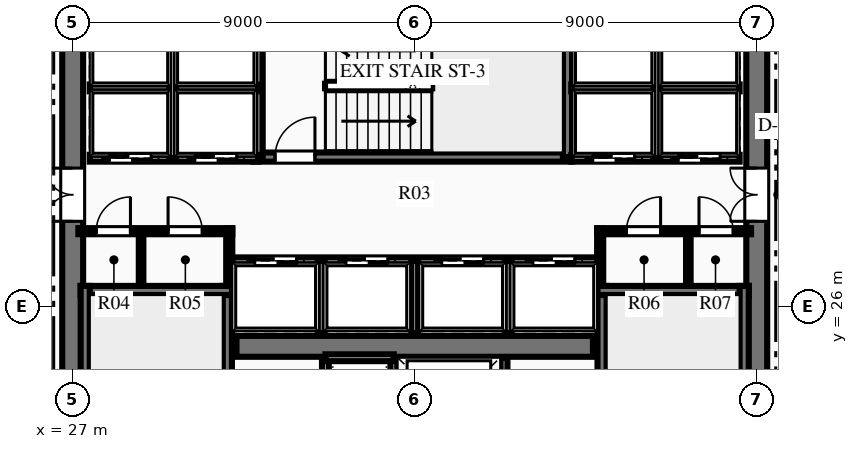
"""IFC4 building model, lengths in metres.
Left out: names, types, materials, properties, quantities, classifications, styles, units other than length and angle.
Written with IfcOpenShell. Run it as: python <this file> out.ifc"""

import sys

from ifc_helpers import new_model, si_unit, direction, frame, frame_2d, origin, place, context, subcontext, project, spatial, rectangle, extrude, element, fill, save


model = new_model("IFC4")
c1 = context("Model", 3, precision=1e-05, world=origin(), true_north=direction((0.0, 1.0)))
c2 = subcontext(c1, "Body", "Model", "MODEL_VIEW")
j1 = project(units=[si_unit("LENGTHUNIT", "METRE"), si_unit("PLANEANGLEUNIT", "RADIAN")], contexts=[c1])
p1 = place(None, origin())
s1 = spatial("IfcSite", under=j1, at=p1, CompositionType="ELEMENT")
p2 = place(p1, origin())
s2 = spatial("IfcBuilding", under=s1, at=p2, CompositionType="ELEMENT")
p3 = place(p2, frame((0.0, 0.0, 109.2)))
s3 = spatial("IfcBuildingStorey", under=s2, at=p3, CompositionType="ELEMENT", Elevation=109.2)
p4 = place(p3, frame((27.0, 18.275, 0.0), z_axis=(0.0, 0.0, 1.0), x_axis=(0.0, 1.0, 0.0)))
e1 = element("IfcWall", 1, at=p4, inside=s3, PredefinedType="SHEAR", context=c2, shape_type="SweptSolid", body=[
    extrude(rectangle(XDim=15.45, YDim=0.55, at=frame_2d((7.725, 0.0))), origin(), (0.0, 0.0, 1.0), 3.75),
])
p5 = place(p4, frame((9.965, 0.0, 0.0)))
e2 = element("IfcOpeningElement", 2, at=p5, cuts=e1, PredefinedType="OPENING", context=c2, shape_type="SweptSolid", body=[
    extrude(rectangle(XDim=1.4, YDim=2.2, at=frame_2d((0.7, 1.1))), frame((0.0, 0.285, 0.0), z_axis=(0.0, -1.0, 0.0), x_axis=(1.0, 0.0, 0.0)), (0.0, 0.0, 1.0), 0.57),
])
p6 = place(p3, frame((45.0, 18.275, 0.0), z_axis=(0.0, 0.0, 1.0), x_axis=(0.0, 1.0, 0.0)))
e3 = element("IfcWall", 3, at=p6, inside=s3, PredefinedType="SHEAR", context=c2, shape_type="SweptSolid", body=[
    extrude(rectangle(XDim=15.45, YDim=0.55, at=frame_2d((7.725, 0.0))), origin(), (0.0, 0.0, 1.0), 3.75),
])
p7 = place(p6, frame((9.965, 0.0, 0.0)))
e4 = element("IfcOpeningElement", 4, at=p7, cuts=e3, PredefinedType="OPENING", context=c2, shape_type="SweptSolid", body=[
    extrude(rectangle(XDim=1.4, YDim=2.2, at=frame_2d((0.7, 1.1))), frame((0.0, 0.285, 0.0), z_axis=(0.0, -1.0, 0.0), x_axis=(1.0, 0.0, 0.0)), (0.0, 0.0, 1.0), 0.57),
])
p8 = place(p3, frame((31.31, 24.95, 0.0), z_axis=(0.0, 0.0, 1.0), x_axis=(1.0, 0.0, 0.0)))
e5 = element("IfcWall", 5, at=p8, inside=s3, PredefinedType="SHEAR", context=c2, shape_type="SweptSolid", body=[
    extrude(rectangle(XDim=9.38, YDim=0.55, at=frame_2d((4.69, 0.0))), origin(), (0.0, 0.0, 1.0), 3.75),
])
p9 = place(p3, frame((31.07, 18.28, 0.0), z_axis=(0.0, 0.0, 1.0), x_axis=(0.0, 1.0, 0.0)))
e6 = element("IfcWall", 6, at=p9, inside=s3, PredefinedType="SHEAR", context=c2, shape_type="SweptSolid", body=[
    extrude(rectangle(XDim=8.26, YDim=0.24, at=frame_2d((4.13, 0.0))), origin(), (0.0, 0.0, 1.0), 3.75),
])
p10 = place(p9, frame((0.365, 0.0, 0.0)))
e7 = element("IfcOpeningElement", 7, at=p10, cuts=e6, PredefinedType="OPENING", context=c2, shape_type="SweptSolid", body=[
    extrude(rectangle(XDim=1.05, YDim=2.15, at=frame_2d((0.525, 1.075))), frame((0.0, 0.13, 0.0), z_axis=(0.0, -1.0, 0.0), x_axis=(1.0, 0.0, 0.0)), (0.0, 0.0, 1.0), 0.26),
])
p11 = place(p3, frame((27.21, 26.42, 0.0), z_axis=(0.0, 0.0, 1.0), x_axis=(1.0, 0.0, 0.0)))
e8 = element("IfcWall", 8, at=p11, inside=s3, PredefinedType="SHEAR", context=c2, shape_type="SweptSolid", body=[
    extrude(rectangle(XDim=3.98, YDim=0.24, at=frame_2d((1.99, 0.0))), origin(), (0.0, 0.0, 1.0), 3.75),
])
p12 = place(p3, frame((27.33, 18.28, 0.0), z_axis=(0.0, 0.0, 1.0), x_axis=(0.0, 1.0, 0.0)))
e9 = element("IfcWall", 9, at=p12, inside=s3, PredefinedType="SHEAR", context=c2, shape_type="SweptSolid", body=[
    extrude(rectangle(XDim=8.26, YDim=0.24, at=frame_2d((4.13, 0.0))), origin(), (0.0, 0.0, 1.0), 3.75),
])
p13 = place(p3, frame((40.93, 18.28, 0.0), z_axis=(0.0, 0.0, 1.0), x_axis=(0.0, 1.0, 0.0)))
e10 = element("IfcWall", 10, at=p13, inside=s3, PredefinedType="SHEAR", context=c2, shape_type="SweptSolid", body=[
    extrude(rectangle(XDim=8.26, YDim=0.24, at=frame_2d((4.13, 0.0))), origin(), (0.0, 0.0, 1.0), 3.75),
])
p14 = place(p13, frame((0.365, 0.0, 0.0)))
e11 = element("IfcOpeningElement", 11, at=p14, cuts=e10, PredefinedType="OPENING", context=c2, shape_type="SweptSolid", body=[
    extrude(rectangle(XDim=1.05, YDim=2.15, at=frame_2d((0.525, 1.075))), frame((0.0, 0.13, 0.0), z_axis=(0.0, -1.0, 0.0), x_axis=(1.0, 0.0, 0.0)), (0.0, 0.0, 1.0), 0.26),
])
p15 = place(p3, frame((40.81, 26.42, 0.0), z_axis=(0.0, 0.0, 1.0), x_axis=(1.0, 0.0, 0.0)))
e12 = element("IfcWall", 12, at=p15, inside=s3, PredefinedType="SHEAR", context=c2, shape_type="SweptSolid", body=[
    extrude(rectangle(XDim=3.98, YDim=0.24, at=frame_2d((1.99, 0.0))), origin(), (0.0, 0.0, 1.0), 3.75),
])
p16 = place(p3, frame((44.67, 18.28, 0.0), z_axis=(0.0, 0.0, 1.0), x_axis=(0.0, 1.0, 0.0)))
e13 = element("IfcWall", 13, at=p16, inside=s3, PredefinedType="SHEAR", context=c2, shape_type="SweptSolid", body=[
    extrude(rectangle(XDim=8.26, YDim=0.24, at=frame_2d((4.13, 0.0))), origin(), (0.0, 0.0, 1.0), 3.75),
])
p17 = place(p3, frame((31.76, 29.93, 0.0), z_axis=(0.0, 0.0, 1.0), x_axis=(1.0, 0.0, 0.0)))
e14 = element("IfcWall", 14, at=p17, inside=s3, PredefinedType="SHEAR", context=c2, shape_type="SweptSolid", body=[
    extrude(rectangle(XDim=8.38, YDim=0.24, at=frame_2d((4.19, 0.0))), origin(), (0.0, 0.0, 1.0), 3.75),
])
p18 = place(p17, frame((0.565, 0.0, 0.0)))
e15 = element("IfcOpeningElement", 15, at=p18, cuts=e14, PredefinedType="OPENING", context=c2, shape_type="SweptSolid", body=[
    extrude(rectangle(XDim=1.05, YDim=2.15, at=frame_2d((0.525, 1.075))), frame((0.0, 0.13, 0.0), z_axis=(0.0, -1.0, 0.0), x_axis=(1.0, 0.0, 0.0)), (0.0, 0.0, 1.0), 0.26),
])
p19 = place(p3, frame((31.88, 29.93, 0.0), z_axis=(0.0, 0.0, 1.0), x_axis=(0.0, 1.0, 0.0)))
e16 = element("IfcWall", 16, at=p19, inside=s3, PredefinedType="SHEAR", context=c2, shape_type="SweptSolid", body=[
    extrude(rectangle(XDim=3.79, YDim=0.24, at=frame_2d((1.895, 0.0))), origin(), (0.0, 0.0, 1.0), 3.75),
])
p20 = place(p3, frame((40.02, 29.93, 0.0), z_axis=(0.0, 0.0, 1.0), x_axis=(0.0, 1.0, 0.0)))
e17 = element("IfcWall", 17, at=p20, inside=s3, PredefinedType="SHEAR", context=c2, shape_type="SweptSolid", body=[
    extrude(rectangle(XDim=3.85, YDim=0.24, at=frame_2d((1.925, 0.0))), origin(), (0.0, 0.0, 1.0), 3.75),
])
for number, where, z_axis, x_axis in (
    (18, (33.65, 22.05, 0.0), (0.0, 0.0, 1.0), (0.0, 1.0, 0.0)),
    (19, (35.45, 22.05, 0.0), (0.0, 0.0, 1.0), (0.0, 1.0, 0.0)),
):
    element("IfcWall", number, at=place(p3, frame(where, z_axis=z_axis, x_axis=x_axis)), inside=s3, PredefinedType="PARTITIONING", context=c2, shape_type="SweptSolid", body=[
        extrude(rectangle(XDim=2.6, YDim=0.18, at=frame_2d((1.3, 0.0))), origin(), (0.0, 0.0, 1.0), 3.45),
    ])
p21 = place(p3, frame((33.65, 24.65, 0.0), z_axis=(0.0, 0.0, 1.0), x_axis=(1.0, 0.0, 0.0)))
e20 = element("IfcWall", 20, at=p21, inside=s3, PredefinedType="PARTITIONING", context=c2, shape_type="SweptSolid", body=[
    extrude(rectangle(XDim=1.8, YDim=0.18, at=frame_2d((0.9, 0.0))), origin(), (0.0, 0.0, 1.0), 3.45),
])
p22 = place(p3, frame((38.35, 22.05, 0.0), z_axis=(0.0, 0.0, 1.0), x_axis=(0.0, 1.0, 0.0)))
e21 = element("IfcWall", 21, at=p22, inside=s3, PredefinedType="PARTITIONING", context=c2, shape_type="SweptSolid", body=[
    extrude(rectangle(XDim=2.6, YDim=0.18, at=frame_2d((1.3, 0.0))), origin(), (0.0, 0.0, 1.0), 3.45),
])
p23 = place(p3, frame((27.15, 27.98, 0.0), z_axis=(0.0, 0.0, 1.0), x_axis=(1.0, 0.0, 0.0)))
e22 = element("IfcWall", 22, at=p23, inside=s3, PredefinedType="PARTITIONING", context=c2, shape_type="SweptSolid", body=[
    extrude(rectangle(XDim=4.05, YDim=0.16, at=frame_2d((2.025, 0.0))), origin(), (0.0, 0.0, 1.0), 3.45),
])
p24 = place(p23, frame((0.47, 0.0, 0.0)))
e23 = element("IfcOpeningElement", 23, at=p24, cuts=e22, PredefinedType="OPENING", context=c2, shape_type="SweptSolid", body=[
    extrude(rectangle(XDim=0.9, YDim=2.15, at=frame_2d((0.45, 1.075))), frame((0.0, 0.09, 0.0), z_axis=(0.0, -1.0, 0.0), x_axis=(1.0, 0.0, 0.0)), (0.0, 0.0, 1.0), 0.18),
])
p25 = place(p23, frame((2.36, 0.0, 0.0)))
e24 = element("IfcOpeningElement", 24, at=p25, cuts=e22, PredefinedType="OPENING", context=c2, shape_type="SweptSolid", body=[
    extrude(rectangle(XDim=0.9, YDim=2.15, at=frame_2d((0.45, 1.075))), frame((0.0, 0.09, 0.0), z_axis=(0.0, -1.0, 0.0), x_axis=(1.0, 0.0, 0.0)), (0.0, 0.0, 1.0), 0.18),
])
p26 = place(p3, frame((31.12, 26.54, 0.0), z_axis=(0.0, 0.0, 1.0), x_axis=(0.0, 1.0, 0.0)))
e25 = element("IfcWall", 25, at=p26, inside=s3, PredefinedType="PARTITIONING", context=c2, shape_type="SweptSolid", body=[
    extrude(rectangle(XDim=1.51, YDim=0.16, at=frame_2d((0.755, 0.0))), origin(), (0.0, 0.0, 1.0), 3.45),
])
p27 = place(p3, frame((40.8, 27.98, 0.0), z_axis=(0.0, 0.0, 1.0), x_axis=(1.0, 0.0, 0.0)))
e26 = element("IfcWall", 26, at=p27, inside=s3, PredefinedType="PARTITIONING", context=c2, shape_type="SweptSolid", body=[
    extrude(rectangle(XDim=4.05, YDim=0.16, at=frame_2d((2.025, 0.0))), origin(), (0.0, 0.0, 1.0), 3.45),
])
p28 = place(p27, frame((0.77, 0.0, 0.0)))
e27 = element("IfcOpeningElement", 27, at=p28, cuts=e26, PredefinedType="OPENING", context=c2, shape_type="SweptSolid", body=[
    extrude(rectangle(XDim=0.9, YDim=2.15, at=frame_2d((0.45, 1.075))), frame((0.0, 0.09, 0.0), z_axis=(0.0, -1.0, 0.0), x_axis=(1.0, 0.0, 0.0)), (0.0, 0.0, 1.0), 0.18),
])
p29 = place(p27, frame((2.68, 0.0, 0.0)))
e28 = element("IfcOpeningElement", 28, at=p29, cuts=e26, PredefinedType="OPENING", context=c2, shape_type="SweptSolid", body=[
    extrude(rectangle(XDim=0.9, YDim=2.15, at=frame_2d((0.45, 1.075))), frame((0.0, 0.09, 0.0), z_axis=(0.0, -1.0, 0.0), x_axis=(1.0, 0.0, 0.0)), (0.0, 0.0, 1.0), 0.18),
])
p30 = place(p3, frame((40.88, 26.54, 0.0), z_axis=(0.0, 0.0, 1.0), x_axis=(0.0, 1.0, 0.0)))
e29 = element("IfcWall", 29, at=p30, inside=s3, PredefinedType="PARTITIONING", context=c2, shape_type="SweptSolid", body=[
    extrude(rectangle(XDim=1.51, YDim=0.16, at=frame_2d((0.755, 0.0))), origin(), (0.0, 0.0, 1.0), 3.45),
])
for number, where, z_axis, x_axis in (
    (30, (28.8, 26.54, 0.0), (0.0, 0.0, 1.0), (0.0, 1.0, 0.0)),
    (31, (43.2, 26.54, 0.0), (0.0, 0.0, 1.0), (0.0, 1.0, 0.0)),
):
    element("IfcWall", number, at=place(p3, frame(where, z_axis=z_axis, x_axis=x_axis)), inside=s3, PredefinedType="PARTITIONING", context=c2, shape_type="SweptSolid", body=[
        extrude(rectangle(XDim=1.44, YDim=0.12, at=frame_2d((0.72, 0.0))), origin(), (0.0, 0.0, 1.0), 3.45),
    ])
p31 = place(p3, frame((27.45, 29.9, 0.0), z_axis=(0.0, 0.0, 1.0), x_axis=(1.0, 0.0, 0.0)))
e32 = element("IfcWall", 32, at=p31, inside=s3, PredefinedType="PARTITIONING", context=c2, shape_type="SweptSolid", body=[
    extrude(rectangle(XDim=4.43, YDim=0.18, at=frame_2d((2.215, 0.0))), origin(), (0.0, 0.0, 1.0), 3.45),
])
p32 = place(p31, frame((0.515, 0.0, 0.0)))
e33 = element("IfcOpeningElement", 33, at=p32, cuts=e32, PredefinedType="OPENING", context=c2, shape_type="SweptSolid", body=[
    extrude(rectangle(XDim=1.1, YDim=2.15, at=frame_2d((0.55, 1.075))), frame((0.0, 0.1, 0.0), z_axis=(0.0, -1.0, 0.0), x_axis=(1.0, 0.0, 0.0)), (0.0, 0.0, 1.0), 0.2),
])
p33 = place(p31, frame((2.765, 0.0, 0.0)))
e34 = element("IfcOpeningElement", 34, at=p33, cuts=e32, PredefinedType="OPENING", context=c2, shape_type="SweptSolid", body=[
    extrude(rectangle(XDim=1.1, YDim=2.15, at=frame_2d((0.55, 1.075))), frame((0.0, 0.1, 0.0), z_axis=(0.0, -1.0, 0.0), x_axis=(1.0, 0.0, 0.0)), (0.0, 0.0, 1.0), 0.2),
])
p34 = place(p3, frame((27.45, 31.75, 0.0), z_axis=(0.0, 0.0, 1.0), x_axis=(1.0, 0.0, 0.0)))
e35 = element("IfcWall", 35, at=p34, inside=s3, PredefinedType="PARTITIONING", context=c2, shape_type="SweptSolid", body=[
    extrude(rectangle(XDim=4.43, YDim=0.18, at=frame_2d((2.215, 0.0))), origin(), (0.0, 0.0, 1.0), 3.45),
])
p35 = place(p3, frame((29.63, 29.9, 0.0), z_axis=(0.0, 0.0, 1.0), x_axis=(0.0, 1.0, 0.0)))
e36 = element("IfcWall", 36, at=p35, inside=s3, PredefinedType="PARTITIONING", context=c2, shape_type="SweptSolid", body=[
    extrude(rectangle(XDim=3.75, YDim=0.18, at=frame_2d((1.875, 0.0))), origin(), (0.0, 0.0, 1.0), 3.45),
])
p36 = place(p3, frame((40.12, 29.9, 0.0), z_axis=(0.0, 0.0, 1.0), x_axis=(1.0, 0.0, 0.0)))
e37 = element("IfcWall", 37, at=p36, inside=s3, PredefinedType="PARTITIONING", context=c2, shape_type="SweptSolid", body=[
    extrude(rectangle(XDim=4.43, YDim=0.18, at=frame_2d((2.215, 0.0))), origin(), (0.0, 0.0, 1.0), 3.45),
])
p37 = place(p36, frame((0.565, 0.0, 0.0)))
e38 = element("IfcOpeningElement", 38, at=p37, cuts=e37, PredefinedType="OPENING", context=c2, shape_type="SweptSolid", body=[
    extrude(rectangle(XDim=1.1, YDim=2.15, at=frame_2d((0.55, 1.075))), frame((0.0, 0.1, 0.0), z_axis=(0.0, -1.0, 0.0), x_axis=(1.0, 0.0, 0.0)), (0.0, 0.0, 1.0), 0.2),
])
p38 = place(p36, frame((2.815, 0.0, 0.0)))
e39 = element("IfcOpeningElement", 39, at=p38, cuts=e37, PredefinedType="OPENING", context=c2, shape_type="SweptSolid", body=[
    extrude(rectangle(XDim=1.1, YDim=2.15, at=frame_2d((0.55, 1.075))), frame((0.0, 0.1, 0.0), z_axis=(0.0, -1.0, 0.0), x_axis=(1.0, 0.0, 0.0)), (0.0, 0.0, 1.0), 0.2),
])
p39 = place(p3, frame((40.12, 31.75, 0.0), z_axis=(0.0, 0.0, 1.0), x_axis=(1.0, 0.0, 0.0)))
e40 = element("IfcWall", 40, at=p39, inside=s3, PredefinedType="PARTITIONING", context=c2, shape_type="SweptSolid", body=[
    extrude(rectangle(XDim=4.43, YDim=0.18, at=frame_2d((2.215, 0.0))), origin(), (0.0, 0.0, 1.0), 3.45),
])
p40 = place(p3, frame((42.37, 29.9, 0.0), z_axis=(0.0, 0.0, 1.0), x_axis=(0.0, 1.0, 0.0)))
e41 = element("IfcWall", 41, at=p40, inside=s3, PredefinedType="PARTITIONING", context=c2, shape_type="SweptSolid", body=[
    extrude(rectangle(XDim=3.75, YDim=0.18, at=frame_2d((1.875, 0.0))), origin(), (0.0, 0.0, 1.0), 3.45),
])
p41 = place(p3, frame((31.2, 27.2, 0.0), z_axis=(0.0, 0.0, 1.0), x_axis=(1.0, 0.0, 0.0)))
e42 = element("IfcWall", 42, at=p41, inside=s3, PredefinedType="PARTITIONING", context=c2, shape_type="SweptSolid", body=[
    extrude(rectangle(XDim=9.6, YDim=0.18, at=frame_2d((4.8, 0.0))), origin(), (0.0, 0.0, 1.0), 3.45),
])
p42 = place(p41, frame((0.59, 0.0, 0.0)))
e43 = element("IfcOpeningElement", 43, at=p42, cuts=e42, PredefinedType="OPENING", context=c2, shape_type="SweptSolid", body=[
    extrude(rectangle(XDim=1.1, YDim=2.15, at=frame_2d((0.55, 1.075))), frame((0.0, 0.1, 0.0), z_axis=(0.0, -1.0, 0.0), x_axis=(1.0, 0.0, 0.0)), (0.0, 0.0, 1.0), 0.2),
])
p43 = place(p41, frame((2.99, 0.0, 0.0)))
e44 = element("IfcOpeningElement", 44, at=p43, cuts=e42, PredefinedType="OPENING", context=c2, shape_type="SweptSolid", body=[
    extrude(rectangle(XDim=1.1, YDim=2.15, at=frame_2d((0.55, 1.075))), frame((0.0, 0.1, 0.0), z_axis=(0.0, -1.0, 0.0), x_axis=(1.0, 0.0, 0.0)), (0.0, 0.0, 1.0), 0.2),
])
p44 = place(p41, frame((5.51, 0.0, 0.0)))
e45 = element("IfcOpeningElement", 45, at=p44, cuts=e42, PredefinedType="OPENING", context=c2, shape_type="SweptSolid", body=[
    extrude(rectangle(XDim=1.1, YDim=2.15, at=frame_2d((0.55, 1.075))), frame((0.0, 0.1, 0.0), z_axis=(0.0, -1.0, 0.0), x_axis=(1.0, 0.0, 0.0)), (0.0, 0.0, 1.0), 0.2),
])
p45 = place(p41, frame((7.91, 0.0, 0.0)))
e46 = element("IfcOpeningElement", 46, at=p45, cuts=e42, PredefinedType="OPENING", context=c2, shape_type="SweptSolid", body=[
    extrude(rectangle(XDim=1.1, YDim=2.15, at=frame_2d((0.55, 1.075))), frame((0.0, 0.1, 0.0), z_axis=(0.0, -1.0, 0.0), x_axis=(1.0, 0.0, 0.0)), (0.0, 0.0, 1.0), 0.2),
])
for number, where, z_axis, x_axis in (
    (47, (33.54, 25.3, 0.0), (0.0, 0.0, 1.0), (0.0, 1.0, 0.0)),
    (48, (36.0, 25.3, 0.0), (0.0, 0.0, 1.0), (0.0, 1.0, 0.0)),
    (49, (38.46, 25.3, 0.0), (0.0, 0.0, 1.0), (0.0, 1.0, 0.0)),
):
    element("IfcWall", number, at=place(p3, frame(where, z_axis=z_axis, x_axis=x_axis)), inside=s3, PredefinedType="PARTITIONING", context=c2, shape_type="SweptSolid", body=[
        extrude(rectangle(XDim=1.9, YDim=0.18, at=frame_2d((0.95, 0.0))), origin(), (0.0, 0.0, 1.0), 3.45),
    ])
p46 = place(p24, origin())
e50 = element("IfcDoor", 50, at=p46, inside=s3, OperationType="SINGLE_SWING_RIGHT", PredefinedType="DOOR", context=c2, shape_type="SweptSolid", body=[
    extrude(rectangle(XDim=0.9, YDim=2.15, at=frame_2d((0.45, 1.075))), frame((0.0, 0.025, 0.0), z_axis=(0.0, -1.0, 0.0), x_axis=(1.0, 0.0, 0.0)), (0.0, 0.0, 1.0), 0.05),
])
fill(e23, e50)
p47 = place(p25, origin())
e51 = element("IfcDoor", 51, at=p47, inside=s3, OperationType="SINGLE_SWING_LEFT", PredefinedType="DOOR", context=c2, shape_type="SweptSolid", body=[
    extrude(rectangle(XDim=0.9, YDim=2.15, at=frame_2d((0.45, 1.075))), frame((0.0, 0.025, 0.0), z_axis=(0.0, -1.0, 0.0), x_axis=(1.0, 0.0, 0.0)), (0.0, 0.0, 1.0), 0.05),
])
fill(e24, e51)
p48 = place(p28, origin())
e52 = element("IfcDoor", 52, at=p48, inside=s3, OperationType="SINGLE_SWING_RIGHT", PredefinedType="DOOR", context=c2, shape_type="SweptSolid", body=[
    extrude(rectangle(XDim=0.9, YDim=2.15, at=frame_2d((0.45, 1.075))), frame((0.0, 0.025, 0.0), z_axis=(0.0, -1.0, 0.0), x_axis=(1.0, 0.0, 0.0)), (0.0, 0.0, 1.0), 0.05),
])
fill(e27, e52)
p49 = place(p29, origin())
e53 = element("IfcDoor", 53, at=p49, inside=s3, OperationType="SINGLE_SWING_LEFT", PredefinedType="DOOR", context=c2, shape_type="SweptSolid", body=[
    extrude(rectangle(XDim=0.9, YDim=2.15, at=frame_2d((0.45, 1.075))), frame((0.0, 0.025, 0.0), z_axis=(0.0, -1.0, 0.0), x_axis=(1.0, 0.0, 0.0)), (0.0, 0.0, 1.0), 0.05),
])
fill(e28, e53)
p50 = place(p18, origin())
e54 = element("IfcDoor", 54, at=p50, inside=s3, OperationType="SINGLE_SWING_RIGHT", PredefinedType="DOOR", context=c2, shape_type="SweptSolid", body=[
    extrude(rectangle(XDim=1.05, YDim=2.15, at=frame_2d((0.525, 1.075))), frame((0.0, 0.025, 0.0), z_axis=(0.0, -1.0, 0.0), x_axis=(1.0, 0.0, 0.0)), (0.0, 0.0, 1.0), 0.05),
])
fill(e15, e54)
p51 = place(p5, origin())
e55 = element("IfcDoor", 55, at=p51, inside=s3, OperationType="DOUBLE_DOOR_SINGLE_SWING", PredefinedType="DOOR", context=c2, shape_type="SweptSolid", body=[
    extrude(rectangle(XDim=1.4, YDim=2.2, at=frame_2d((0.7, 1.1))), frame((0.0, 0.025, 0.0), z_axis=(0.0, -1.0, 0.0), x_axis=(1.0, 0.0, 0.0)), (0.0, 0.0, 1.0), 0.05),
])
fill(e2, e55)
p52 = place(p7, origin())
e56 = element("IfcDoor", 56, at=p52, inside=s3, OperationType="DOUBLE_DOOR_SINGLE_SWING", PredefinedType="DOOR", context=c2, shape_type="SweptSolid", body=[
    extrude(rectangle(XDim=1.4, YDim=2.2, at=frame_2d((0.7, 1.1))), frame((0.0, 0.025, 0.0), z_axis=(0.0, -1.0, 0.0), x_axis=(1.0, 0.0, 0.0)), (0.0, 0.0, 1.0), 0.05),
])
fill(e4, e56)
p53 = place(p32, origin())
e57 = element("IfcDoor", 57, at=p53, inside=s3, OperationType="SLIDING_TO_LEFT", PredefinedType="DOOR", context=c2, shape_type="SweptSolid", body=[
    extrude(rectangle(XDim=1.1, YDim=2.15, at=frame_2d((0.55, 1.075))), frame((0.0, 0.025, 0.0), z_axis=(0.0, -1.0, 0.0), x_axis=(1.0, 0.0, 0.0)), (0.0, 0.0, 1.0), 0.05),
])
fill(e33, e57)
p54 = place(p33, origin())
e58 = element("IfcDoor", 58, at=p54, inside=s3, OperationType="SLIDING_TO_LEFT", PredefinedType="DOOR", context=c2, shape_type="SweptSolid", body=[
    extrude(rectangle(XDim=1.1, YDim=2.15, at=frame_2d((0.55, 1.075))), frame((0.0, 0.025, 0.0), z_axis=(0.0, -1.0, 0.0), x_axis=(1.0, 0.0, 0.0)), (0.0, 0.0, 1.0), 0.05),
])
fill(e34, e58)
p55 = place(p37, origin())
e59 = element("IfcDoor", 59, at=p55, inside=s3, OperationType="SLIDING_TO_LEFT", PredefinedType="DOOR", context=c2, shape_type="SweptSolid", body=[
    extrude(rectangle(XDim=1.1, YDim=2.15, at=frame_2d((0.55, 1.075))), frame((0.0, 0.025, 0.0), z_axis=(0.0, -1.0, 0.0), x_axis=(1.0, 0.0, 0.0)), (0.0, 0.0, 1.0), 0.05),
])
fill(e38, e59)
p56 = place(p38, origin())
e60 = element("IfcDoor", 60, at=p56, inside=s3, OperationType="SLIDING_TO_LEFT", PredefinedType="DOOR", context=c2, shape_type="SweptSolid", body=[
    extrude(rectangle(XDim=1.1, YDim=2.15, at=frame_2d((0.55, 1.075))), frame((0.0, 0.025, 0.0), z_axis=(0.0, -1.0, 0.0), x_axis=(1.0, 0.0, 0.0)), (0.0, 0.0, 1.0), 0.05),
])
fill(e39, e60)
p57 = place(p42, origin())
e61 = element("IfcDoor", 61, at=p57, inside=s3, OperationType="SLIDING_TO_LEFT", PredefinedType="DOOR", context=c2, shape_type="SweptSolid", body=[
    extrude(rectangle(XDim=1.1, YDim=2.15, at=frame_2d((0.55, 1.075))), frame((0.0, 0.025, 0.0), z_axis=(0.0, -1.0, 0.0), x_axis=(1.0, 0.0, 0.0)), (0.0, 0.0, 1.0), 0.05),
])
fill(e43, e61)
p58 = place(p43, origin())
e62 = element("IfcDoor", 62, at=p58, inside=s3, OperationType="SLIDING_TO_LEFT", PredefinedType="DOOR", context=c2, shape_type="SweptSolid", body=[
    extrude(rectangle(XDim=1.1, YDim=2.15, at=frame_2d((0.55, 1.075))), frame((0.0, 0.025, 0.0), z_axis=(0.0, -1.0, 0.0), x_axis=(1.0, 0.0, 0.0)), (0.0, 0.0, 1.0), 0.05),
])
fill(e44, e62)
p59 = place(p44, origin())
e63 = element("IfcDoor", 63, at=p59, inside=s3, OperationType="SLIDING_TO_LEFT", PredefinedType="DOOR", context=c2, shape_type="SweptSolid", body=[
    extrude(rectangle(XDim=1.1, YDim=2.15, at=frame_2d((0.55, 1.075))), frame((0.0, 0.025, 0.0), z_axis=(0.0, -1.0, 0.0), x_axis=(1.0, 0.0, 0.0)), (0.0, 0.0, 1.0), 0.05),
])
fill(e45, e63)
p60 = place(p45, origin())
e64 = element("IfcDoor", 64, at=p60, inside=s3, OperationType="SLIDING_TO_LEFT", PredefinedType="DOOR", context=c2, shape_type="SweptSolid", body=[
    extrude(rectangle(XDim=1.1, YDim=2.15, at=frame_2d((0.55, 1.075))), frame((0.0, 0.025, 0.0), z_axis=(0.0, -1.0, 0.0), x_axis=(1.0, 0.0, 0.0)), (0.0, 0.0, 1.0), 0.05),
])
fill(e46, e64)
save(model, sys.argv[1])
